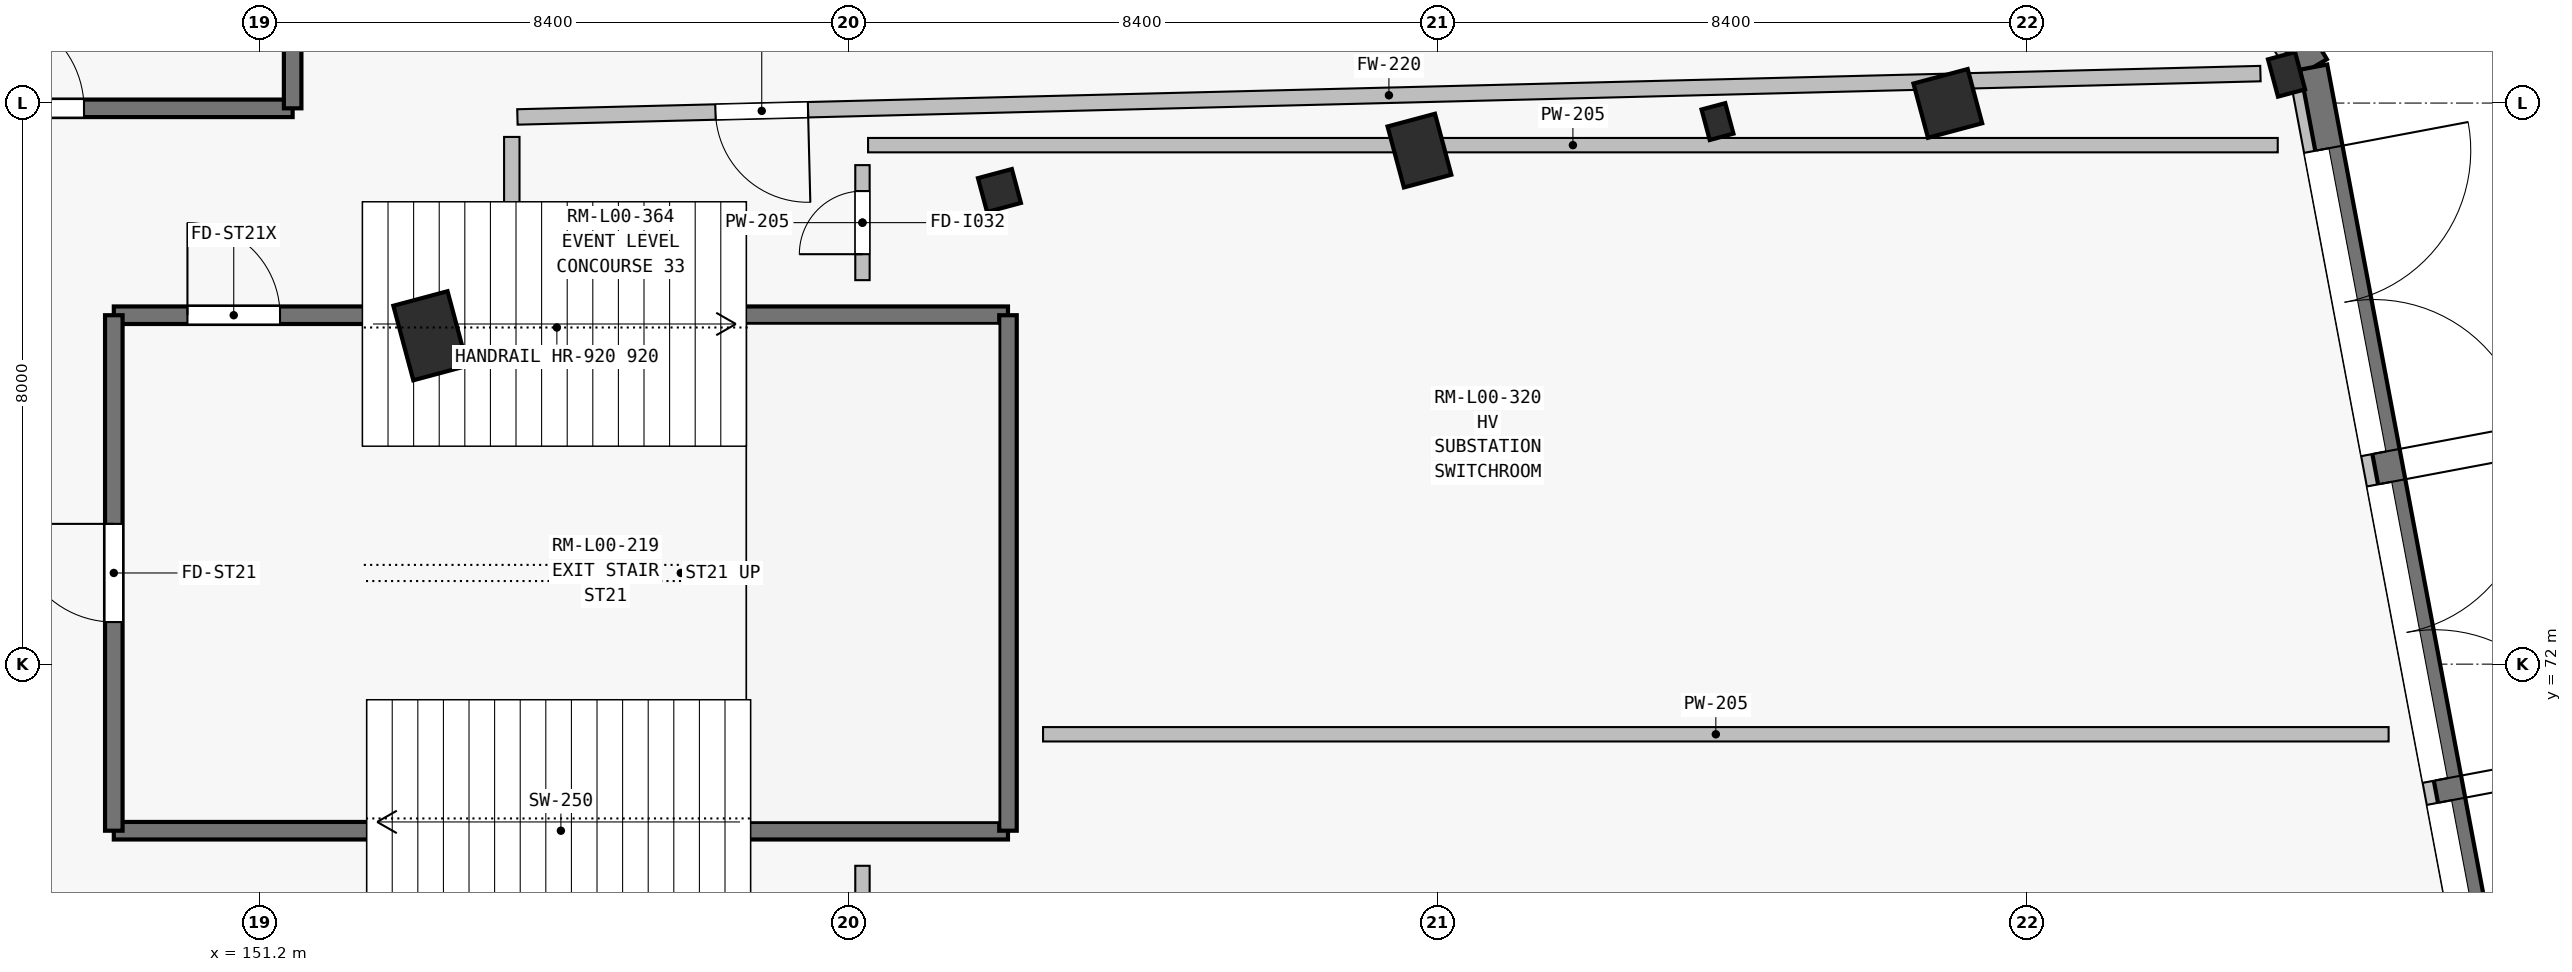
"""IFC4 building model, lengths in metres.
Left out: names, types, materials, properties, quantities, classifications, styles, units other than length and angle.
Written with IfcOpenShell. Run it as: python <this file> out.ifc"""

import sys

from ifc_helpers import new_model, si_unit, direction, frame, frame_2d, origin, origin_2d, place, context, subcontext, project, spatial, rectangle, i_section, extrude, element, fill, save


model = new_model("IFC4")
c1 = context("Model", 3, precision=1e-05, world=origin(), true_north=direction((0.0, 1.0)))
c2 = subcontext(c1, "Body", "Model", "MODEL_VIEW")
j1 = project(units=[si_unit("LENGTHUNIT", "METRE"), si_unit("PLANEANGLEUNIT", "RADIAN")], contexts=[c1])
p1 = place(None, origin())
s1 = spatial("IfcSite", under=j1, at=p1, CompositionType="ELEMENT")
p2 = place(p1, origin())
s2 = spatial("IfcBuilding", under=s1, at=p2, CompositionType="ELEMENT")
p3 = place(p2, origin())
s3 = spatial("IfcBuildingStorey", under=s2, at=p3, CompositionType="ELEMENT", Elevation=0.0)
p4 = place(p3, frame((153.64, 76.682, 0.0), z_axis=(0.0, 0.0, 1.0), x_axis=(0.965925826289, 0.258819045103, 0.0)))
e1 = element("IfcColumn", 1, at=p4, inside=s3, PredefinedType="COLUMN", context=c2, shape_type="SweptSolid", body=[
    extrude(rectangle(XDim=0.8, YDim=1.1, at=origin_2d()), origin(), (0.0, 0.0, 1.0), 5.4),
])
p5 = place(p3, frame((161.753, 78.753, 0.0), z_axis=(0.0, 0.0, 1.0), x_axis=(0.965925826289, 0.258819045103, 0.0)))
e2 = element("IfcColumn", 2, at=p5, inside=s3, PredefinedType="COLUMN", context=c2, shape_type="SweptSolid", body=[
    extrude(i_section(OverallWidth=0.5, OverallDepth=0.5, WebThickness=0.02, FlangeThickness=0.035, at=origin_2d()), origin(), (0.0, 0.0, 1.0), 5.4),
])
p6 = place(p3, frame((167.742, 79.322, 0.0), z_axis=(0.0, 0.0, 1.0), x_axis=(0.965925826289, 0.258819045103, 0.0)))
e3 = element("IfcColumn", 3, at=p6, inside=s3, PredefinedType="COLUMN", context=c2, shape_type="SweptSolid", body=[
    extrude(rectangle(XDim=0.7, YDim=0.9, at=origin_2d()), origin(), (0.0, 0.0, 1.0), 5.4),
])
p7 = place(p3, frame((175.276, 79.995, 0.0), z_axis=(0.0, 0.0, 1.0), x_axis=(0.965925826289, 0.258819045103, 0.0)))
e4 = element("IfcColumn", 4, at=p7, inside=s3, PredefinedType="COLUMN", context=c2, shape_type="SweptSolid", body=[
    extrude(rectangle(XDim=0.8, YDim=0.8, at=origin_2d()), origin(), (0.0, 0.0, 1.0), 5.4),
])
p8 = place(p3, frame((180.106, 80.409, 0.0), z_axis=(0.0, 0.0, 1.0), x_axis=(0.965925826289, 0.258819045103, 0.0)))
e5 = element("IfcColumn", 5, at=p8, inside=s3, PredefinedType="PILASTER", context=c2, shape_type="SweptSolid", body=[
    extrude(rectangle(XDim=0.4, YDim=0.55, at=origin_2d()), origin(), (0.0, 0.0, 1.0), 6.35),
])
p9 = place(p3, frame((171.992, 79.736, 0.0), z_axis=(0.0, 0.0, 1.0), x_axis=(0.965925826289, 0.258819045103, 0.0)))
e6 = element("IfcColumn", 6, at=p9, inside=s3, PredefinedType="PILASTER", context=c2, shape_type="SweptSolid", body=[
    extrude(rectangle(XDim=0.35, YDim=0.45, at=origin_2d()), origin(), (0.0, 0.0, 1.0), 5.4),
])
p10 = place(p3, frame((171.205, 95.845, 0.0), z_axis=(0.0, 0.0, 1.0), x_axis=(0.509495845346, -0.860473116126, 0.0)))
e7 = element("IfcWall", 7, at=p10, inside=s3, PredefinedType="SOLIDWALL", context=c2, shape_type="SweptSolid", body=[
    extrude(rectangle(XDim=17.969, YDim=0.36, at=frame_2d((8.984, 0.0))), origin(), (0.0, 0.0, 1.0), 5.15),
])
p11 = place(p10, frame((10.56, 0.0, 0.0)))
e8 = element("IfcOpeningElement", 8, at=p11, cuts=e7, PredefinedType="OPENING", context=c2, shape_type="SweptSolid", body=[
    extrude(rectangle(XDim=2.9, YDim=2.55, at=frame_2d((1.45, 1.275))), frame((0.0, 0.19, 0.0), z_axis=(0.0, -1.0, 0.0), x_axis=(1.0, 0.0, 0.0)), (0.0, 0.0, 1.0), 0.38),
])
p12 = place(p10, frame((1.22, 0.0, 0.0)))
e9 = element("IfcOpeningElement", 9, at=p12, cuts=e7, PredefinedType="OPENING", context=c2, shape_type="SweptSolid", body=[
    extrude(rectangle(XDim=4.1, YDim=2.7, at=frame_2d((2.05, 1.35))), frame((0.0, 0.19, 0.0), z_axis=(0.0, -1.0, 0.0), x_axis=(1.0, 0.0, 0.0)), (0.0, 0.0, 1.0), 0.38),
])
p13 = place(p10, frame((13.76, 0.0, 0.0)))
e10 = element("IfcOpeningElement", 10, at=p13, cuts=e7, PredefinedType="OPENING", context=c2, shape_type="SweptSolid", body=[
    extrude(rectangle(XDim=2.9, YDim=2.55, at=frame_2d((1.45, 1.275))), frame((0.0, 0.19, 0.0), z_axis=(0.0, -1.0, 0.0), x_axis=(1.0, 0.0, 0.0)), (0.0, 0.0, 1.0), 0.38),
])
p14 = place(p3, frame((180.308, 80.522, 0.0), z_axis=(0.0, 0.0, 1.0), x_axis=(0.184944832345, -0.982748904344, 0.0)))
e11 = element("IfcWall", 11, at=p14, inside=s3, PredefinedType="SOLIDWALL", context=c2, shape_type="SweptSolid", body=[
    extrude(rectangle(XDim=16.889, YDim=0.36, at=frame_2d((8.444, 0.0))), origin(), (0.0, 0.0, 1.0), 5.15),
])
p15 = place(p14, frame((1.22, 0.0, 0.0)))
e12 = element("IfcOpeningElement", 12, at=p15, cuts=e11, PredefinedType="OPENING", context=c2, shape_type="SweptSolid", body=[
    extrude(rectangle(XDim=4.4, YDim=2.75, at=frame_2d((2.2, 1.375))), frame((0.0, 0.19, 0.0), z_axis=(0.0, -1.0, 0.0), x_axis=(1.0, 0.0, 0.0)), (0.0, 0.0, 1.0), 0.38),
])
p16 = place(p14, frame((6.06, 0.0, 0.0)))
e13 = element("IfcOpeningElement", 13, at=p16, cuts=e11, PredefinedType="OPENING", context=c2, shape_type="SweptSolid", body=[
    extrude(rectangle(XDim=4.3, YDim=2.75, at=frame_2d((2.15, 1.375))), frame((0.0, 0.19, 0.0), z_axis=(0.0, -1.0, 0.0), x_axis=(1.0, 0.0, 0.0)), (0.0, 0.0, 1.0), 0.38),
])
p17 = place(p14, frame((10.68, 0.0, 0.0)))
e14 = element("IfcOpeningElement", 14, at=p17, cuts=e11, PredefinedType="OPENING", context=c2, shape_type="SweptSolid", body=[
    extrude(rectangle(XDim=4.2, YDim=2.7, at=frame_2d((2.1, 1.35))), frame((0.0, 0.19, 0.0), z_axis=(0.0, -1.0, 0.0), x_axis=(1.0, 0.0, 0.0)), (0.0, 0.0, 1.0), 0.38),
])
p18 = place(p3, frame((171.382, 95.9, -4.5), z_axis=(0.0, 0.0, 1.0), x_axis=(0.509491740649, -0.86047554655, 0.0)))
e15 = element("IfcWall", 15, at=p18, inside=s3, PredefinedType="USERDEFINED", context=c2, shape_type="SweptSolid", body=[
    extrude(rectangle(XDim=17.882, YDim=0.44, at=frame_2d((8.941, 0.0))), origin(), (0.0, 0.0, 1.0), 4.5),
])
p19 = place(p3, frame((180.492, 80.513, -4.5), z_axis=(0.0, 0.0, 1.0), x_axis=(0.184951716714, -0.98274760874, 0.0)))
e16 = element("IfcWall", 16, at=p19, inside=s3, PredefinedType="USERDEFINED", context=c2, shape_type="SweptSolid", body=[
    extrude(rectangle(XDim=16.802, YDim=0.395, at=frame_2d((8.401, 0.0))), origin(), (0.0, 0.0, 1.0), 4.5),
])
p20 = place(p3, frame((149.125, 69.625, 0.0), z_axis=(0.0, 0.0, 1.0), x_axis=(1.0, 0.0, 0.0)))
e17 = element("IfcWall", 17, at=p20, inside=s3, PredefinedType="SHEAR", context=c2, shape_type="SweptSolid", body=[
    extrude(rectangle(XDim=12.75, YDim=0.25, at=frame_2d((6.375, 0.0))), origin(), (0.0, 0.0, 1.0), 5.4),
])
p21 = place(p3, frame((149.125, 76.975, 0.0), z_axis=(0.0, 0.0, 1.0), x_axis=(1.0, 0.0, 0.0)))
e18 = element("IfcWall", 18, at=p21, inside=s3, PredefinedType="SHEAR", context=c2, shape_type="SweptSolid", body=[
    extrude(rectangle(XDim=12.75, YDim=0.25, at=frame_2d((6.375, 0.0))), origin(), (0.0, 0.0, 1.0), 5.4),
])
p22 = place(p21, frame((1.05, 0.0, 0.0)))
e19 = element("IfcOpeningElement", 19, at=p22, cuts=e18, PredefinedType="OPENING", context=c2, shape_type="SweptSolid", body=[
    extrude(rectangle(XDim=1.32, YDim=2.2, at=frame_2d((0.66, 1.1))), frame((0.0, 0.135, 0.0), z_axis=(0.0, -1.0, 0.0), x_axis=(1.0, 0.0, 0.0)), (0.0, 0.0, 1.0), 0.27),
])
p23 = place(p3, frame((149.125, 69.625, 0.0), z_axis=(0.0, 0.0, 1.0), x_axis=(0.0, 1.0, 0.0)))
e20 = element("IfcWall", 20, at=p23, inside=s3, PredefinedType="SHEAR", context=c2, shape_type="SweptSolid", body=[
    extrude(rectangle(XDim=7.35, YDim=0.25, at=frame_2d((3.675, 0.0))), origin(), (0.0, 0.0, 1.0), 5.4),
])
p24 = place(p23, frame((2.975, 0.0, 0.0)))
e21 = element("IfcOpeningElement", 21, at=p24, cuts=e20, PredefinedType="OPENING", context=c2, shape_type="SweptSolid", body=[
    extrude(rectangle(XDim=1.4, YDim=2.2, at=frame_2d((0.7, 1.1))), frame((0.0, 0.135, 0.0), z_axis=(0.0, -1.0, 0.0), x_axis=(1.0, 0.0, 0.0)), (0.0, 0.0, 1.0), 0.27),
])
p25 = place(p3, frame((161.875, 69.625, 0.0), z_axis=(0.0, 0.0, 1.0), x_axis=(0.0, 1.0, 0.0)))
e22 = element("IfcWall", 22, at=p25, inside=s3, PredefinedType="SHEAR", context=c2, shape_type="SweptSolid", body=[
    extrude(rectangle(XDim=7.35, YDim=0.25, at=frame_2d((3.675, 0.0))), origin(), (0.0, 0.0, 1.0), 5.4),
])
p26 = place(p3, frame((144.325, 79.925, 0.0), z_axis=(0.0, 0.0, 1.0), x_axis=(1.0, 0.0, 0.0)))
e23 = element("IfcWall", 23, at=p26, inside=s3, PredefinedType="SHEAR", context=c2, shape_type="SweptSolid", body=[
    extrude(rectangle(XDim=7.35, YDim=0.25, at=frame_2d((3.675, 0.0))), origin(), (0.0, 0.0, 1.0), 5.4),
])
p27 = place(p26, frame((2.975, 0.0, 0.0)))
e24 = element("IfcOpeningElement", 24, at=p27, cuts=e23, PredefinedType="OPENING", context=c2, shape_type="SweptSolid", body=[
    extrude(rectangle(XDim=1.4, YDim=2.2, at=frame_2d((0.7, 1.1))), frame((0.0, 0.135, 0.0), z_axis=(0.0, -1.0, 0.0), x_axis=(1.0, 0.0, 0.0)), (0.0, 0.0, 1.0), 0.27),
])
p28 = place(p3, frame((151.675, 79.925, 0.0), z_axis=(0.0, 0.0, 1.0), x_axis=(0.0, 1.0, 0.0)))
e25 = element("IfcWall", 25, at=p28, inside=s3, PredefinedType="SHEAR", context=c2, shape_type="SweptSolid", body=[
    extrude(rectangle(XDim=12.75, YDim=0.25, at=frame_2d((6.375, 0.0))), origin(), (0.0, 0.0, 1.0), 5.4),
])
p29 = place(p3, frame((162.375, 71.0, 0.0), z_axis=(0.0, 0.0, 1.0), x_axis=(1.0, 0.0, 0.0)))
e26 = element("IfcWall", 26, at=p29, inside=s3, PredefinedType="SOLIDWALL", context=c2, shape_type="SweptSolid", body=[
    extrude(rectangle(XDim=19.187, YDim=0.205, at=frame_2d((9.593, 0.0))), origin(), (0.0, 0.0, 1.0), 4.295),
])
p30 = place(p3, frame((159.8, 58.875, 0.0), z_axis=(0.0, 0.0, 1.0), x_axis=(0.0, 1.0, 0.0)))
e27 = element("IfcWall", 27, at=p30, inside=s3, PredefinedType="SOLIDWALL", context=c2, shape_type="SweptSolid", body=[
    extrude(rectangle(XDim=10.25, YDim=0.205, at=frame_2d((5.125, 0.0))), origin(), (0.0, 0.0, 1.0), 4.483),
])
p31 = place(p30, frame((4.2, 0.0, 0.0)))
e28 = element("IfcOpeningElement", 28, at=p31, cuts=e27, PredefinedType="OPENING", context=c2, shape_type="SweptSolid", body=[
    extrude(rectangle(XDim=1.85, YDim=2.4, at=frame_2d((0.925, 1.2))), frame((0.0, 0.113, 0.0), z_axis=(0.0, -1.0, 0.0), x_axis=(1.0, 0.0, 0.0)), (0.0, 0.0, 1.0), 0.225),
])
p32 = place(p3, frame((159.88, 79.4, 0.0), z_axis=(0.0, 0.0, 1.0), x_axis=(1.0, 0.0, 0.0)))
e29 = element("IfcWall", 29, at=p32, inside=s3, PredefinedType="SOLIDWALL", context=c2, shape_type="SweptSolid", body=[
    extrude(rectangle(XDim=20.101, YDim=0.205, at=frame_2d((10.05, 0.0))), origin(), (0.0, 0.0, 1.0), 4.295),
])
p33 = place(p3, frame((159.8, 77.475, 0.0), z_axis=(0.0, 0.0, 1.0), x_axis=(0.0, 1.0, 0.0)))
e30 = element("IfcWall", 30, at=p33, inside=s3, PredefinedType="SOLIDWALL", context=c2, shape_type="SweptSolid", body=[
    extrude(rectangle(XDim=1.64, YDim=0.205, at=frame_2d((0.82, 0.0))), origin(), (0.0, 0.0, 1.0), 5.12),
])
p34 = place(p33, frame((0.37, 0.0, 0.0)))
e31 = element("IfcOpeningElement", 31, at=p34, cuts=e30, PredefinedType="OPENING", context=c2, shape_type="SweptSolid", body=[
    extrude(rectangle(XDim=0.9, YDim=2.1, at=frame_2d((0.45, 1.05))), frame((0.0, 0.113, 0.0), z_axis=(0.0, -1.0, 0.0), x_axis=(1.0, 0.0, 0.0)), (0.0, 0.0, 1.0), 0.225),
])
p35 = place(p3, frame((179.734, 80.42, 0.0), z_axis=(0.0, 0.0, 1.0), x_axis=(-0.999690839963, -0.024864120614, 0.0)))
e32 = element("IfcWall", 32, at=p35, inside=s3, PredefinedType="SOLIDWALL", context=c2, shape_type="SweptSolid", body=[
    extrude(rectangle(XDim=24.862, YDim=0.22, at=frame_2d((12.431, 0.0))), origin(), (0.0, 0.0, 1.0), 4.295),
])
p36 = place(p35, frame((20.717, 0.0, 0.0)))
e33 = element("IfcOpeningElement", 33, at=p36, cuts=e32, PredefinedType="OPENING", context=c2, shape_type="SweptSolid", body=[
    extrude(rectangle(XDim=1.32, YDim=2.2, at=frame_2d((0.66, 1.1))), frame((0.0, 0.12, 0.0), z_axis=(0.0, -1.0, 0.0), x_axis=(1.0, 0.0, 0.0)), (0.0, 0.0, 1.0), 0.24),
])
p37 = place(p3, frame((154.8, 79.517, 0.0), z_axis=(0.0, 0.0, 1.0), x_axis=(0.0, -1.0, 0.0)))
e34 = element("IfcWall", 34, at=p37, inside=s3, PredefinedType="SOLIDWALL", context=c2, shape_type="SweptSolid", body=[
    extrude(rectangle(XDim=2.042, YDim=0.22, at=frame_2d((1.021, 0.0))), origin(), (0.0, 0.0, 1.0), 5.12),
])
p38 = place(p3, frame((154.8, 69.125, 0.0), z_axis=(0.0, 0.0, 1.0), x_axis=(0.0, -1.0, 0.0)))
e35 = element("IfcWall", 35, at=p38, inside=s3, PredefinedType="SOLIDWALL", context=c2, shape_type="SweptSolid", body=[
    extrude(rectangle(XDim=5.825, YDim=0.22, at=frame_2d((2.913, 0.0))), origin(), (0.0, 0.0, 1.0), 4.483),
])
p39 = place(p15, origin())
e36 = element("IfcDoor", 36, at=p39, inside=s3, OperationType="DOUBLE_DOOR_SINGLE_SWING", PredefinedType="DOOR", context=c2, shape_type="SweptSolid", body=[
    extrude(rectangle(XDim=4.4, YDim=2.75, at=frame_2d((2.2, 1.375))), frame((0.0, 0.025, 0.0), z_axis=(0.0, -1.0, 0.0), x_axis=(1.0, 0.0, 0.0)), (0.0, 0.0, 1.0), 0.05),
])
fill(e12, e36)
p40 = place(p16, origin())
e37 = element("IfcDoor", 37, at=p40, inside=s3, OperationType="DOUBLE_DOOR_SINGLE_SWING", PredefinedType="DOOR", context=c2, shape_type="SweptSolid", body=[
    extrude(rectangle(XDim=4.3, YDim=2.75, at=frame_2d((2.15, 1.375))), frame((0.0, 0.025, 0.0), z_axis=(0.0, -1.0, 0.0), x_axis=(1.0, 0.0, 0.0)), (0.0, 0.0, 1.0), 0.05),
])
fill(e13, e37)
p41 = place(p17, origin())
e38 = element("IfcDoor", 38, at=p41, inside=s3, OperationType="DOUBLE_DOOR_SINGLE_SWING", PredefinedType="DOOR", context=c2, shape_type="SweptSolid", body=[
    extrude(rectangle(XDim=4.2, YDim=2.7, at=frame_2d((2.1, 1.35))), frame((0.0, 0.025, 0.0), z_axis=(0.0, -1.0, 0.0), x_axis=(1.0, 0.0, 0.0)), (0.0, 0.0, 1.0), 0.05),
])
fill(e14, e38)
p42 = place(p24, origin())
e39 = element("IfcDoor", 39, at=p42, inside=s3, OperationType="SINGLE_SWING_RIGHT", PredefinedType="DOOR", context=c2, shape_type="SweptSolid", body=[
    extrude(rectangle(XDim=1.4, YDim=2.2, at=frame_2d((0.7, 1.1))), frame((0.0, 0.025, 0.0), z_axis=(0.0, -1.0, 0.0), x_axis=(1.0, 0.0, 0.0)), (0.0, 0.0, 1.0), 0.05),
])
fill(e21, e39)
p43 = place(p22, origin())
e40 = element("IfcDoor", 40, at=p43, inside=s3, OperationType="SINGLE_SWING_LEFT", PredefinedType="DOOR", context=c2, shape_type="SweptSolid", body=[
    extrude(rectangle(XDim=1.32, YDim=2.2, at=frame_2d((0.66, 1.1))), frame((0.0, 0.025, 0.0), z_axis=(0.0, -1.0, 0.0), x_axis=(1.0, 0.0, 0.0)), (0.0, 0.0, 1.0), 0.05),
])
fill(e19, e40)
p44 = place(p27, origin())
e41 = element("IfcDoor", 41, at=p44, inside=s3, OperationType="SINGLE_SWING_LEFT", PredefinedType="DOOR", context=c2, shape_type="SweptSolid", body=[
    extrude(rectangle(XDim=1.4, YDim=2.2, at=frame_2d((0.7, 1.1))), frame((0.0, 0.025, 0.0), z_axis=(0.0, -1.0, 0.0), x_axis=(1.0, 0.0, 0.0)), (0.0, 0.0, 1.0), 0.05),
])
fill(e24, e41)
p45 = place(p34, origin())
e42 = element("IfcDoor", 42, at=p45, inside=s3, OperationType="SINGLE_SWING_LEFT", PredefinedType="DOOR", context=c2, shape_type="SweptSolid", body=[
    extrude(rectangle(XDim=0.9, YDim=2.1, at=frame_2d((0.45, 1.05))), frame((0.0, 0.025, 0.0), z_axis=(0.0, -1.0, 0.0), x_axis=(1.0, 0.0, 0.0)), (0.0, 0.0, 1.0), 0.05),
])
fill(e31, e42)
p46 = place(p36, origin())
e43 = element("IfcDoor", 43, at=p46, inside=s3, OperationType="SINGLE_SWING_LEFT", PredefinedType="DOOR", context=c2, shape_type="SweptSolid", body=[
    extrude(rectangle(XDim=1.32, YDim=2.2, at=frame_2d((0.66, 1.1))), frame((0.0, 0.025, 0.0), z_axis=(0.0, -1.0, 0.0), x_axis=(1.0, 0.0, 0.0)), (0.0, 0.0, 1.0), 0.05),
])
fill(e33, e43)
save(model, sys.argv[1])
